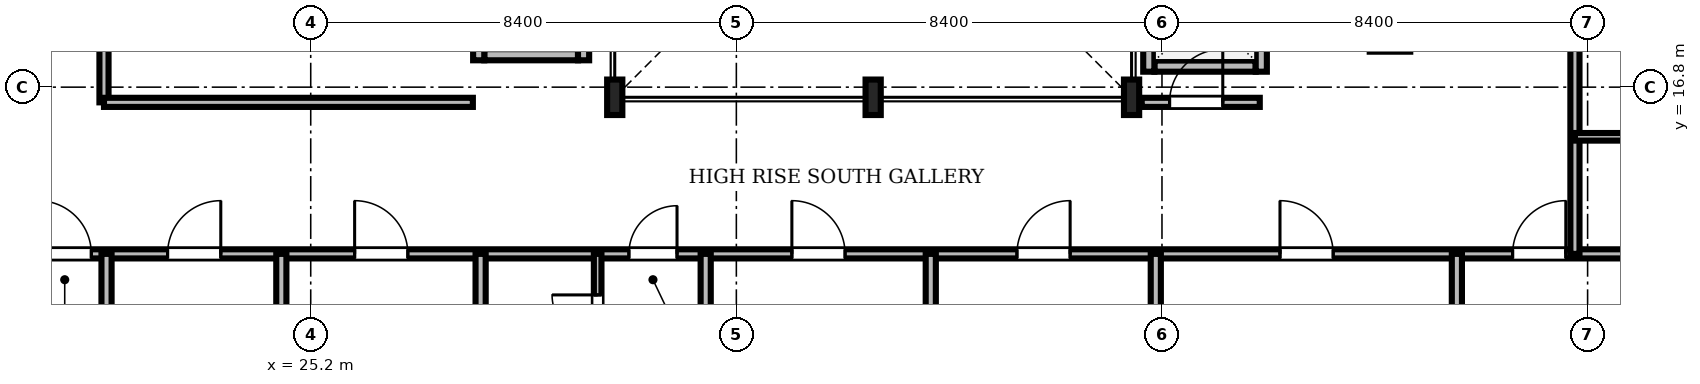
"""IFC4 building model, lengths in metres.
Left out: names, types, materials, properties, quantities, classifications, styles, units other than length and angle.
Written with IfcOpenShell. Run it as: python <this file> out.ifc"""

import sys

from ifc_helpers import new_model, si_unit, direction, frame, frame_2d, origin, origin_2d, place, context, subcontext, project, spatial, rectangle, i_section, extrude, source, transform, mapped, element, fill, save


model = new_model("IFC4")
c1 = context("Model", 3, precision=1e-05, world=origin(), true_north=direction((0.0, 1.0)))
c2 = subcontext(c1, "Body", "Model", "MODEL_VIEW")
j1 = project(units=[si_unit("LENGTHUNIT", "METRE"), si_unit("PLANEANGLEUNIT", "RADIAN")], contexts=[c1])
p1 = place(None, origin())
s1 = spatial("IfcSite", under=j1, at=p1, CompositionType="ELEMENT")
p2 = place(p1, origin())
s2 = spatial("IfcBuilding", under=s1, at=p2, CompositionType="ELEMENT")
p3 = place(p2, frame((0.0, 0.0, 211.05)))
s3 = spatial("IfcBuildingStorey", under=s2, at=p3, CompositionType="ELEMENT", Elevation=211.05)
m1 = source(origin(), c2, "Body", "SweptSolid", [
    extrude(i_section(OverallWidth=0.3, OverallDepth=0.7, WebThickness=0.017, FlangeThickness=0.032, FilletRadius=0.027, at=origin_2d()), origin(), (0.0, 0.0, 1.0), 3.53),
])
for number, where, z_axis, x_axis in (
    (1, (31.2, 16.6, 0.0), (0.0, 0.0, 1.0), (1.0, 0.0, 0.0)),
    (2, (36.3, 16.6, 0.0), (0.0, 0.0, 1.0), (1.0, 0.0, 0.0)),
    (3, (41.4, 16.6, 0.0), (0.0, 0.0, 1.0), (1.0, 0.0, 0.0)),
):
    element("IfcColumn", number, at=place(p3, frame(where, z_axis=z_axis, x_axis=x_axis)), inside=s3, PredefinedType="COLUMN", context=c2, shape_type="MappedRepresentation", body=[
        mapped(m1, transform((0.0, 0.0, 0.0), scale=1.0)),
    ])
m2 = source(origin(), c2, "Body", "SweptSolid", [
    extrude(rectangle(XDim=2.0, YDim=0.22, at=frame_2d((1.0, 0.0))), origin(), (0.0, 0.0, 1.0), 3.53),
])
p4 = place(p3, frame((41.85, 17.215, 0.0), z_axis=(0.0, 0.0, 1.0), x_axis=(1.0, 0.0, 0.0)))
e4 = element("IfcWall", 4, at=p4, inside=s3, PredefinedType="SOLIDWALL", context=c2, shape_type="MappedRepresentation", body=[
    mapped(m2, transform((0.0, 0.0, 0.0), scale=1.0)),
])
m3 = source(origin(), c2, "Body", "SweptSolid", [
    extrude(rectangle(XDim=2.19, YDim=0.22, at=frame_2d((1.095, 0.0))), origin(), (0.0, 0.0, 1.0), 3.53),
])
p5 = place(p3, frame((41.74, 17.105, 0.0), z_axis=(0.0, 0.0, 1.0), x_axis=(0.0, 1.0, 0.0)))
e5 = element("IfcWall", 5, at=p5, inside=s3, PredefinedType="SOLIDWALL", context=c2, shape_type="MappedRepresentation", body=[
    mapped(m3, transform((0.0, 0.0, 0.0), scale=1.0)),
])
p6 = place(p3, frame((43.96, 17.105, 0.0), z_axis=(0.0, 0.0, 1.0), x_axis=(0.0, 1.0, 0.0)))
e6 = element("IfcWall", 6, at=p6, inside=s3, PredefinedType="SOLIDWALL", context=c2, shape_type="MappedRepresentation", body=[
    mapped(m3, transform((0.0, 0.0, 0.0), scale=1.0)),
])
m4 = source(origin(), c2, "Body", "SweptSolid", [
    extrude(rectangle(XDim=1.1, YDim=2.2, at=frame_2d((0.55, 1.1))), frame((0.0, 0.12, 0.0), z_axis=(0.0, -1.0, 0.0), x_axis=(1.0, 0.0, 0.0)), (0.0, 0.0, 1.0), 0.24),
])
p7 = place(p6, frame((0.545, 0.0, 0.0)))
e7 = element("IfcOpeningElement", 7, at=p7, cuts=e6, PredefinedType="OPENING", context=c2, shape_type="MappedRepresentation", body=[
    mapped(m4, transform((0.0, 0.0, 0.0), scale=1.0)),
])
m5 = source(origin(), c2, "Body", "SweptSolid", [
    extrude(rectangle(XDim=1.85, YDim=0.22, at=frame_2d((0.925, 0.0))), origin(), (0.0, 0.0, 1.0), 2.972),
])
p8 = place(p3, frame((28.625, 17.44, 0.0), z_axis=(0.0, 0.0, 1.0), x_axis=(1.0, 0.0, 0.0)))
e8 = element("IfcWall", 8, at=p8, inside=s3, PredefinedType="SOLIDWALL", context=c2, shape_type="MappedRepresentation", body=[
    mapped(m5, transform((0.0, 0.0, 0.0), scale=1.0)),
])
m6 = source(origin(), c2, "Body", "SweptSolid", [
    extrude(rectangle(XDim=2.54, YDim=0.22, at=frame_2d((1.27, 0.0))), origin(), (0.0, 0.0, 1.0), 2.972),
])
p9 = place(p3, frame((28.515, 17.33, 0.0), z_axis=(0.0, 0.0, 1.0), x_axis=(0.0, 1.0, 0.0)))
e9 = element("IfcWall", 9, at=p9, inside=s3, PredefinedType="SOLIDWALL", context=c2, shape_type="MappedRepresentation", body=[
    mapped(m6, transform((0.0, 0.0, 0.0), scale=1.0)),
])
m7 = source(origin(), c2, "Body", "SweptSolid", [
    extrude(rectangle(XDim=2.54, YDim=0.22, at=frame_2d((1.27, 0.0))), origin(), (0.0, 0.0, 1.0), 3.53),
])
p10 = place(p3, frame((30.585, 17.33, 0.0), z_axis=(0.0, 0.0, 1.0), x_axis=(0.0, 1.0, 0.0)))
e10 = element("IfcWall", 10, at=p10, inside=s3, PredefinedType="SOLIDWALL", context=c2, shape_type="MappedRepresentation", body=[
    mapped(m7, transform((0.0, 0.0, 0.0), scale=1.0)),
])
m8 = source(origin(), c2, "Body", "SweptSolid", [
    extrude(rectangle(XDim=46.156, YDim=0.18, at=frame_2d((23.078, 0.0))), origin(), (0.0, 0.0, 1.0), 2.772),
])
p11 = place(p3, frame((11.422, 13.51, 0.0), z_axis=(0.0, 0.0, 1.0), x_axis=(1.0, 0.0, 0.0)))
e11 = element("IfcWall", 11, at=p11, inside=s3, PredefinedType="PARTITIONING", context=c2, shape_type="MappedRepresentation", body=[
    mapped(m8, transform((0.0, 0.0, 0.0), scale=1.0)),
])
m9 = source(origin(), c2, "Body", "SweptSolid", [
    extrude(rectangle(XDim=1.05, YDim=2.2, at=frame_2d((0.525, 1.1))), frame((0.0, 0.1, 0.0), z_axis=(0.0, -1.0, 0.0), x_axis=(1.0, 0.0, 0.0)), (0.0, 0.0, 1.0), 0.2),
])
p12 = place(p11, frame((8.398, 0.0, 0.0)))
e12 = element("IfcOpeningElement", 12, at=p12, cuts=e11, PredefinedType="OPENING", context=c2, shape_type="MappedRepresentation", body=[
    mapped(m9, transform((0.0, 0.0, 0.0), scale=1.0)),
])
p13 = place(p11, frame((10.953, 0.0, 0.0)))
e13 = element("IfcOpeningElement", 13, at=p13, cuts=e11, PredefinedType="OPENING", context=c2, shape_type="MappedRepresentation", body=[
    mapped(m9, transform((0.0, 0.0, 0.0), scale=1.0)),
])
p14 = place(p11, frame((14.645, 0.0, 0.0)))
e14 = element("IfcOpeningElement", 14, at=p14, cuts=e11, PredefinedType="OPENING", context=c2, shape_type="MappedRepresentation", body=[
    mapped(m9, transform((0.0, 0.0, 0.0), scale=1.0)),
])
m10 = source(origin(), c2, "Body", "SweptSolid", [
    extrude(rectangle(XDim=0.95, YDim=2.15, at=frame_2d((0.475, 1.075))), frame((0.0, 0.1, 0.0), z_axis=(0.0, -1.0, 0.0), x_axis=(1.0, 0.0, 0.0)), (0.0, 0.0, 1.0), 0.2),
])
p15 = place(p11, frame((20.057, 0.0, 0.0)))
e15 = element("IfcOpeningElement", 15, at=p15, cuts=e11, PredefinedType="OPENING", context=c2, shape_type="MappedRepresentation", body=[
    mapped(m10, transform((0.0, 0.0, 0.0), scale=1.0)),
])
p16 = place(p11, frame((23.274, 0.0, 0.0)))
e16 = element("IfcOpeningElement", 16, at=p16, cuts=e11, PredefinedType="OPENING", context=c2, shape_type="MappedRepresentation", body=[
    mapped(m9, transform((0.0, 0.0, 0.0), scale=1.0)),
])
p17 = place(p11, frame((27.716, 0.0, 0.0)))
e17 = element("IfcOpeningElement", 17, at=p17, cuts=e11, PredefinedType="OPENING", context=c2, shape_type="MappedRepresentation", body=[
    mapped(m9, transform((0.0, 0.0, 0.0), scale=1.0)),
])
p18 = place(p11, frame((32.907, 0.0, 0.0)))
e18 = element("IfcOpeningElement", 18, at=p18, cuts=e11, PredefinedType="OPENING", context=c2, shape_type="MappedRepresentation", body=[
    mapped(m9, transform((0.0, 0.0, 0.0), scale=1.0)),
])
p19 = place(p11, frame((37.498, 0.0, 0.0)))
e19 = element("IfcOpeningElement", 19, at=p19, cuts=e11, PredefinedType="OPENING", context=c2, shape_type="MappedRepresentation", body=[
    mapped(m9, transform((0.0, 0.0, 0.0), scale=1.0)),
])
m11 = source(origin(), c2, "Body", "SweptSolid", [
    extrude(rectangle(XDim=27.59, YDim=0.18, at=frame_2d((13.795, 0.0))), origin(), (0.0, 0.0, 1.0), 2.972),
])
p20 = place(p3, frame((50.15, 13.51, 0.0), z_axis=(0.0, 0.0, 1.0), x_axis=(0.0, 1.0, 0.0)))
e20 = element("IfcWall", 20, at=p20, inside=s3, PredefinedType="PARTITIONING", context=c2, shape_type="MappedRepresentation", body=[
    mapped(m11, transform((0.0, 0.0, 0.0), scale=1.0)),
])
p21 = place(p20, frame((4.086, 0.0, 0.0)))
e21 = element("IfcOpeningElement", 21, at=p21, cuts=e20, PredefinedType="OPENING", context=c2, shape_type="MappedRepresentation", body=[
    mapped(m9, transform((0.0, 0.0, 0.0), scale=1.0)),
])
p22 = place(p20, frame((9.744, 0.0, 0.0)))
e22 = element("IfcOpeningElement", 22, at=p22, cuts=e20, PredefinedType="OPENING", context=c2, shape_type="MappedRepresentation", body=[
    mapped(m9, transform((0.0, 0.0, 0.0), scale=1.0)),
])
p23 = place(p20, frame((17.771, 0.0, 0.0)))
e23 = element("IfcOpeningElement", 23, at=p23, cuts=e20, PredefinedType="OPENING", context=c2, shape_type="MappedRepresentation", body=[
    mapped(m9, transform((0.0, 0.0, 0.0), scale=1.0)),
])
p24 = place(p20, frame((24.614, 0.0, 0.0)))
e24 = element("IfcOpeningElement", 24, at=p24, cuts=e20, PredefinedType="OPENING", context=c2, shape_type="MappedRepresentation", body=[
    mapped(m9, transform((0.0, 0.0, 0.0), scale=1.0)),
])
m12 = source(origin(), c2, "Body", "SweptSolid", [
    extrude(rectangle(XDim=11.94, YDim=0.18, at=frame_2d((5.97, 0.0))), origin(), (0.0, 0.0, 1.0), 2.972),
])
p25 = place(p3, frame((21.12, 16.5, 0.0), z_axis=(0.0, 0.0, 1.0), x_axis=(0.0, 1.0, 0.0)))
e25 = element("IfcWall", 25, at=p25, inside=s3, PredefinedType="PARTITIONING", context=c2, shape_type="MappedRepresentation", body=[
    mapped(m12, transform((0.0, 0.0, 0.0), scale=1.0)),
])
p26 = place(p25, frame((4.5, 0.0, 0.0)))
e26 = element("IfcOpeningElement", 26, at=p26, cuts=e25, PredefinedType="OPENING", context=c2, shape_type="MappedRepresentation", body=[
    mapped(m9, transform((0.0, 0.0, 0.0), scale=1.0)),
])
m13 = source(origin(), c2, "Body", "SweptSolid", [
    extrude(rectangle(XDim=2.36, YDim=0.15, at=frame_2d((1.18, 0.0))), origin(), (0.0, 0.0, 1.0), 2.972),
])
p27 = place(p3, frame((30.863, 11.15, 0.0), z_axis=(0.0, 0.0, 1.0), x_axis=(0.0, 1.0, 0.0)))
e27 = element("IfcWall", 27, at=p27, inside=s3, PredefinedType="PARTITIONING", context=c2, shape_type="MappedRepresentation", body=[
    mapped(m13, transform((0.0, 0.0, 0.0), scale=1.0)),
])
m14 = source(origin(), c2, "Body", "SweptSolid", [
    extrude(rectangle(XDim=0.9, YDim=2.1, at=frame_2d((0.45, 1.05))), frame((0.0, 0.085, 0.0), z_axis=(0.0, -1.0, 0.0), x_axis=(1.0, 0.0, 0.0)), (0.0, 0.0, 1.0), 0.17),
])
p28 = place(p27, frame((0.65, 0.0, 0.0)))
e28 = element("IfcOpeningElement", 28, at=p28, cuts=e27, PredefinedType="OPENING", context=c2, shape_type="MappedRepresentation", body=[
    mapped(m14, transform((0.0, 0.0, 0.0), scale=1.0)),
])
m15 = source(origin(), c2, "Body", "SweptSolid", [
    extrude(rectangle(XDim=2.33, YDim=0.18, at=frame_2d((1.165, 0.0))), origin(), (0.0, 0.0, 1.0), 2.972),
])
p29 = place(p3, frame((41.6, 16.5, 0.0), z_axis=(0.0, 0.0, 1.0), x_axis=(1.0, 0.0, 0.0)))
e29 = element("IfcWall", 29, at=p29, inside=s3, PredefinedType="PARTITIONING", context=c2, shape_type="MappedRepresentation", body=[
    mapped(m15, transform((0.0, 0.0, 0.0), scale=1.0)),
])
p30 = place(p29, frame((0.55, 0.0, 0.0)))
e30 = element("IfcOpeningElement", 30, at=p30, cuts=e29, PredefinedType="OPENING", context=c2, shape_type="MappedRepresentation", body=[
    mapped(m9, transform((0.0, 0.0, 0.0), scale=1.0)),
])
m16 = source(origin(), c2, "Body", "SweptSolid", [
    extrude(rectangle(XDim=11.388, YDim=0.2, at=frame_2d((5.694, 0.0))), origin(), (0.0, 0.0, 1.0), 2.772),
])
for number, where, z_axis, x_axis in (
    (31, (21.17, 2.122, 0.0), (0.0, 0.0, 1.0), (0.0, 1.0, 0.0)),
    (32, (24.62, 2.122, 0.0), (0.0, 0.0, 1.0), (0.0, 1.0, 0.0)),
    (33, (28.553, 2.122, 0.0), (0.0, 0.0, 1.0), (0.0, 1.0, 0.0)),
):
    element("IfcWall", number, at=place(p3, frame(where, z_axis=z_axis, x_axis=x_axis)), inside=s3, PredefinedType="PARTITIONING", context=c2, shape_type="MappedRepresentation", body=[
        mapped(m16, transform((0.0, 0.0, 0.0), scale=1.0)),
    ])
m17 = source(origin(), c2, "Body", "SweptSolid", [
    extrude(rectangle(XDim=11.58, YDim=0.2, at=frame_2d((5.79, 0.0))), origin(), (0.0, 0.0, 1.0), 2.772),
])
for number, where, z_axis, x_axis in (
    (34, (32.995, 1.93, 0.0), (0.0, 0.0, 1.0), (0.0, 1.0, 0.0)),
    (35, (37.437, 1.93, 0.0), (0.0, 0.0, 1.0), (0.0, 1.0, 0.0)),
):
    element("IfcWall", number, at=place(p3, frame(where, z_axis=z_axis, x_axis=x_axis)), inside=s3, PredefinedType="PARTITIONING", context=c2, shape_type="MappedRepresentation", body=[
        mapped(m17, transform((0.0, 0.0, 0.0), scale=1.0)),
    ])
for number, where, z_axis, x_axis in (
    (36, (41.878, 2.122, 0.0), (0.0, 0.0, 1.0), (0.0, 1.0, 0.0)),
    (37, (47.82, 2.122, 0.0), (0.0, 0.0, 1.0), (0.0, 1.0, 0.0)),
):
    element("IfcWall", number, at=place(p3, frame(where, z_axis=z_axis, x_axis=x_axis)), inside=s3, PredefinedType="PARTITIONING", context=c2, shape_type="MappedRepresentation", body=[
        mapped(m16, transform((0.0, 0.0, 0.0), scale=1.0)),
    ])
m18 = source(origin(), c2, "Body", "SweptSolid", [
    extrude(rectangle(XDim=7.28, YDim=0.18, at=frame_2d((3.64, 0.0))), origin(), (0.0, 0.0, 1.0), 3.53),
])
p31 = place(p3, frame((21.12, 16.5, 0.0), z_axis=(0.0, 0.0, 1.0), x_axis=(1.0, 0.0, 0.0)))
e38 = element("IfcWall", 38, at=p31, inside=s3, PredefinedType="PARTITIONING", context=c2, shape_type="MappedRepresentation", body=[
    mapped(m18, transform((0.0, 0.0, 0.0), scale=1.0)),
])
m19 = source(origin(), c2, "Body", "SweptSolid", [
    extrude(rectangle(XDim=2.36, YDim=0.15, at=frame_2d((1.18, 0.0))), origin(), (0.0, 0.0, 1.0), 3.53),
])
p32 = place(p3, frame((50.15, 15.82, 0.0), z_axis=(0.0, 0.0, 1.0), x_axis=(1.0, 0.0, 0.0)))
e39 = element("IfcWall", 39, at=p32, inside=s3, PredefinedType="PARTITIONING", context=c2, shape_type="MappedRepresentation", body=[
    mapped(m19, transform((0.0, 0.0, 0.0), scale=1.0)),
])
m20 = source(origin(), c2, "Body", "SweptSolid", [
    extrude(rectangle(XDim=1.05, YDim=2.2, at=frame_2d((0.525, 1.1))), frame((0.0, 0.025, 0.0), z_axis=(0.0, -1.0, 0.0), x_axis=(1.0, 0.0, 0.0)), (0.0, 0.0, 1.0), 0.05),
])
p33 = place(p12, origin())
e40 = element("IfcDoor", 40, at=p33, inside=s3, OperationType="SINGLE_SWING_LEFT", PredefinedType="DOOR", context=c2, shape_type="MappedRepresentation", body=[
    mapped(m20, transform((0.0, 0.0, 0.0), scale=1.0)),
])
fill(e12, e40)
p34 = place(p13, origin())
e41 = element("IfcDoor", 41, at=p34, inside=s3, OperationType="SINGLE_SWING_RIGHT", PredefinedType="DOOR", context=c2, shape_type="MappedRepresentation", body=[
    mapped(m20, transform((0.0, 0.0, 0.0), scale=1.0)),
])
fill(e13, e41)
p35 = place(p14, origin())
e42 = element("IfcDoor", 42, at=p35, inside=s3, OperationType="SINGLE_SWING_LEFT", PredefinedType="DOOR", context=c2, shape_type="MappedRepresentation", body=[
    mapped(m20, transform((0.0, 0.0, 0.0), scale=1.0)),
])
fill(e14, e42)
m21 = source(origin(), c2, "Body", "SweptSolid", [
    extrude(rectangle(XDim=0.95, YDim=2.15, at=frame_2d((0.475, 1.075))), frame((0.0, 0.025, 0.0), z_axis=(0.0, -1.0, 0.0), x_axis=(1.0, 0.0, 0.0)), (0.0, 0.0, 1.0), 0.05),
])
p36 = place(p15, origin())
e43 = element("IfcDoor", 43, at=p36, inside=s3, OperationType="SINGLE_SWING_RIGHT", PredefinedType="DOOR", context=c2, shape_type="MappedRepresentation", body=[
    mapped(m21, transform((0.0, 0.0, 0.0), scale=1.0)),
])
fill(e15, e43)
p37 = place(p16, origin())
e44 = element("IfcDoor", 44, at=p37, inside=s3, OperationType="SINGLE_SWING_LEFT", PredefinedType="DOOR", context=c2, shape_type="MappedRepresentation", body=[
    mapped(m20, transform((0.0, 0.0, 0.0), scale=1.0)),
])
fill(e16, e44)
p38 = place(p17, origin())
e45 = element("IfcDoor", 45, at=p38, inside=s3, OperationType="SINGLE_SWING_RIGHT", PredefinedType="DOOR", context=c2, shape_type="MappedRepresentation", body=[
    mapped(m20, transform((0.0, 0.0, 0.0), scale=1.0)),
])
fill(e17, e45)
p39 = place(p18, origin())
e46 = element("IfcDoor", 46, at=p39, inside=s3, OperationType="SINGLE_SWING_LEFT", PredefinedType="DOOR", context=c2, shape_type="MappedRepresentation", body=[
    mapped(m20, transform((0.0, 0.0, 0.0), scale=1.0)),
])
fill(e18, e46)
p40 = place(p19, origin())
e47 = element("IfcDoor", 47, at=p40, inside=s3, OperationType="SINGLE_SWING_RIGHT", PredefinedType="DOOR", context=c2, shape_type="MappedRepresentation", body=[
    mapped(m20, transform((0.0, 0.0, 0.0), scale=1.0)),
])
fill(e19, e47)
m22 = source(origin(), c2, "Body", "SweptSolid", [
    extrude(rectangle(XDim=0.9, YDim=2.1, at=frame_2d((0.45, 1.05))), frame((0.0, 0.025, 0.0), z_axis=(0.0, -1.0, 0.0), x_axis=(1.0, 0.0, 0.0)), (0.0, 0.0, 1.0), 0.05),
])
p41 = place(p28, origin())
e48 = element("IfcDoor", 48, at=p41, inside=s3, OperationType="SINGLE_SWING_RIGHT", PredefinedType="DOOR", context=c2, shape_type="MappedRepresentation", body=[
    mapped(m22, transform((0.0, 0.0, 0.0), scale=1.0)),
])
fill(e28, e48)
p42 = place(p30, origin())
e49 = element("IfcDoor", 49, at=p42, inside=s3, OperationType="SINGLE_SWING_RIGHT", PredefinedType="DOOR", context=c2, shape_type="MappedRepresentation", body=[
    mapped(m20, transform((0.0, 0.0, 0.0), scale=1.0)),
])
fill(e30, e49)
save(model, sys.argv[1])
